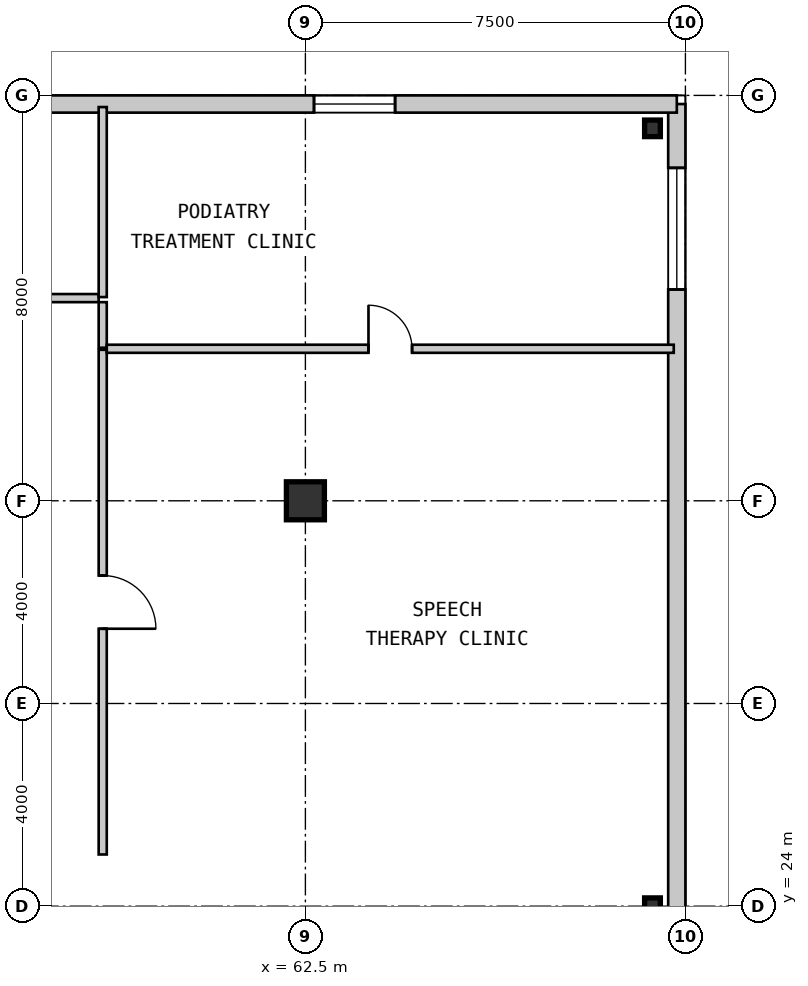
"""IFC4 building model, lengths in metres.
Left out: names, types, materials, properties, quantities, classifications, styles, units other than length and angle.
Written with IfcOpenShell. Run it as: python <this file> out.ifc"""

import sys

from ifc_helpers import new_model, si_unit, direction, frame, frame_2d, origin, origin_2d, place, context, subcontext, project, spatial, rectangle, circle, i_section, extrude, source, transform, mapped, element, fill, save


model = new_model("IFC4")
c1 = context("Model", 3, precision=1e-05, world=origin(), true_north=direction((0.0, 1.0)))
c2 = subcontext(c1, "Body", "Model", "MODEL_VIEW")
j1 = project(units=[si_unit("LENGTHUNIT", "METRE"), si_unit("PLANEANGLEUNIT", "RADIAN")], contexts=[c1])
p1 = place(None, origin())
s1 = spatial("IfcSite", under=j1, at=p1, CompositionType="ELEMENT")
p2 = place(p1, origin())
s2 = spatial("IfcBuilding", under=s1, at=p2, CompositionType="ELEMENT")
p3 = place(p2, frame((0.0, 0.0, 8.4)))
s3 = spatial("IfcBuildingStorey", under=s2, at=p3, CompositionType="ELEMENT", Elevation=8.4)
m1 = source(origin(), c2, "Body", "SweptSolid", [
    extrude(circle(Radius=0.375, at=origin_2d()), origin(), (0.0, 0.0, 1.0), 4.55),
])
p4 = place(p3, frame((62.5, 32.0, 0.0), z_axis=(0.0, 0.0, 1.0), x_axis=(1.0, 0.0, 0.0)))
e1 = element("IfcColumn", 1, at=p4, inside=s3, PredefinedType="COLUMN", context=c2, shape_type="MappedRepresentation", body=[
    mapped(m1, transform((0.0, 0.0, 0.0), scale=1.0)),
])
m2 = source(origin(), c2, "Body", "SweptSolid", [
    extrude(i_section(OverallWidth=0.311, OverallDepth=0.327, WebThickness=0.016, FlangeThickness=0.025, at=origin_2d()), origin(), (0.0, 0.0, 1.0), 4.55),
])
for number, where, z_axis, x_axis in (
    (2, (69.35, 24.0, 0.0), (0.0, 0.0, 1.0), (1.0, 0.0, 0.0)),
    (3, (69.35, 39.35, 0.0), (0.0, 0.0, 1.0), (1.0, 0.0, 0.0)),
):
    element("IfcColumn", number, at=place(p3, frame(where, z_axis=z_axis, x_axis=x_axis)), inside=s3, PredefinedType="COLUMN", context=c2, shape_type="MappedRepresentation", body=[
        mapped(m2, transform((0.0, 0.0, 0.0), scale=1.0)),
    ])
m3 = source(origin(), c2, "Body", "SweptSolid", [
    extrude(rectangle(XDim=39.66, YDim=0.34, at=frame_2d((19.83, 0.0))), origin(), (0.0, 0.0, 1.0), 4.29),
])
p5 = place(p3, frame((69.83, 0.17, 0.0), z_axis=(0.0, 0.0, 1.0), x_axis=(0.0, 1.0, 0.0)))
e4 = element("IfcWall", 4, at=p5, inside=s3, PredefinedType="SOLIDWALL", context=c2, shape_type="MappedRepresentation", body=[
    mapped(m3, transform((0.0, 0.0, 0.0), scale=1.0)),
])
m4 = source(origin(), c2, "Body", "SweptSolid", [
    extrude(rectangle(XDim=1.8, YDim=1.6, at=frame_2d((0.9, 0.8))), frame((0.0, 0.18, 0.0), z_axis=(0.0, -1.0, 0.0), x_axis=(1.0, 0.0, 0.0)), (0.0, 0.0, 1.0), 0.36),
])
p6 = place(p5, frame((3.2, 0.0, 0.95)))
e5 = element("IfcOpeningElement", 5, at=p6, cuts=e4, PredefinedType="OPENING", context=c2, shape_type="MappedRepresentation", body=[
    mapped(m4, transform((0.0, 0.0, 0.0), scale=1.0)),
])
m5 = source(origin(), c2, "Body", "SweptSolid", [
    extrude(rectangle(XDim=1.5, YDim=1.5, at=frame_2d((0.75, 0.75))), frame((0.0, 0.18, 0.0), z_axis=(0.0, -1.0, 0.0), x_axis=(1.0, 0.0, 0.0)), (0.0, 0.0, 1.0), 0.36),
])
p7 = place(p5, frame((7.8, 0.0, 0.95)))
e6 = element("IfcOpeningElement", 6, at=p7, cuts=e4, PredefinedType="OPENING", context=c2, shape_type="MappedRepresentation", body=[
    mapped(m5, transform((0.0, 0.0, 0.0), scale=1.0)),
])
m6 = source(origin(), c2, "Body", "SweptSolid", [
    extrude(rectangle(XDim=1.2, YDim=1.5, at=frame_2d((0.6, 0.75))), frame((0.0, 0.18, 0.0), z_axis=(0.0, -1.0, 0.0), x_axis=(1.0, 0.0, 0.0)), (0.0, 0.0, 1.0), 0.36),
])
p8 = place(p5, frame((21.2, 0.0, 0.95)))
e7 = element("IfcOpeningElement", 7, at=p8, cuts=e4, PredefinedType="OPENING", context=c2, shape_type="MappedRepresentation", body=[
    mapped(m6, transform((0.0, 0.0, 0.0), scale=1.0)),
])
m7 = source(origin(), c2, "Body", "SweptSolid", [
    extrude(rectangle(XDim=2.4, YDim=1.8, at=frame_2d((1.2, 0.9))), frame((0.0, 0.18, 0.0), z_axis=(0.0, -1.0, 0.0), x_axis=(1.0, 0.0, 0.0)), (0.0, 0.0, 1.0), 0.36),
])
p9 = place(p5, frame((36.0, 0.0, 0.95)))
e8 = element("IfcOpeningElement", 8, at=p9, cuts=e4, PredefinedType="OPENING", context=c2, shape_type="MappedRepresentation", body=[
    mapped(m7, transform((0.0, 0.0, 0.0), scale=1.0)),
])
m8 = source(origin(), c2, "Body", "SweptSolid", [
    extrude(rectangle(XDim=69.66, YDim=0.34, at=frame_2d((34.83, 0.0))), origin(), (0.0, 0.0, 1.0), 4.29),
])
p10 = place(p3, frame((0.17, 39.83, 0.0), z_axis=(0.0, 0.0, 1.0), x_axis=(1.0, 0.0, 0.0)))
e9 = element("IfcWall", 9, at=p10, inside=s3, PredefinedType="SOLIDWALL", context=c2, shape_type="MappedRepresentation", body=[
    mapped(m8, transform((0.0, 0.0, 0.0), scale=1.0)),
])
m9 = source(origin(), c2, "Body", "SweptSolid", [
    extrude(rectangle(XDim=1.6, YDim=1.2, at=frame_2d((0.8, 0.6))), frame((0.0, 0.18, 0.0), z_axis=(0.0, -1.0, 0.0), x_axis=(1.0, 0.0, 0.0)), (0.0, 0.0, 1.0), 0.36),
])
p11 = place(p10, frame((4.5, 0.0, 0.95)))
e10 = element("IfcOpeningElement", 10, at=p11, cuts=e9, PredefinedType="OPENING", context=c2, shape_type="MappedRepresentation", body=[
    mapped(m9, transform((0.0, 0.0, 0.0), scale=1.0)),
])
p12 = place(p10, frame((22.5, 0.0, 0.95)))
e11 = element("IfcOpeningElement", 11, at=p12, cuts=e9, PredefinedType="OPENING", context=c2, shape_type="MappedRepresentation", body=[
    mapped(m9, transform((0.0, 0.0, 0.0), scale=1.0)),
])
p13 = place(p10, frame((29.0, 0.0, 0.95)))
e12 = element("IfcOpeningElement", 12, at=p13, cuts=e9, PredefinedType="OPENING", context=c2, shape_type="MappedRepresentation", body=[
    mapped(m9, transform((0.0, 0.0, 0.0), scale=1.0)),
])
p14 = place(p10, frame((40.5, 0.0, 0.95)))
e13 = element("IfcOpeningElement", 13, at=p14, cuts=e9, PredefinedType="OPENING", context=c2, shape_type="MappedRepresentation", body=[
    mapped(m9, transform((0.0, 0.0, 0.0), scale=1.0)),
])
p15 = place(p10, frame((46.5, 0.0, 0.95)))
e14 = element("IfcOpeningElement", 14, at=p15, cuts=e9, PredefinedType="OPENING", context=c2, shape_type="MappedRepresentation", body=[
    mapped(m9, transform((0.0, 0.0, 0.0), scale=1.0)),
])
p16 = place(p10, frame((62.5, 0.0, 0.95)))
e15 = element("IfcOpeningElement", 15, at=p16, cuts=e9, PredefinedType="OPENING", context=c2, shape_type="MappedRepresentation", body=[
    mapped(m9, transform((0.0, 0.0, 0.0), scale=1.0)),
])
m10 = source(origin(), c2, "Body", "SweptSolid", [
    extrude(rectangle(XDim=9.959, YDim=0.16, at=frame_2d((4.98, 0.0))), origin(), (0.0, 0.0, 1.0), 4.29),
])
p17 = place(p3, frame((58.5, 34.98, 0.0), z_axis=(0.0, 0.0, 1.0), x_axis=(0.0, -1.0, 0.0)))
e16 = element("IfcWall", 16, at=p17, inside=s3, PredefinedType="PARTITIONING", context=c2, shape_type="MappedRepresentation", body=[
    mapped(m10, transform((0.0, 0.0, 0.0), scale=1.0)),
])
m11 = source(origin(), c2, "Body", "SweptSolid", [
    extrude(rectangle(XDim=1.05, YDim=2.1, at=frame_2d((0.525, 1.05))), frame((0.0, 0.09, 0.0), z_axis=(0.0, -1.0, 0.0), x_axis=(1.0, 0.0, 0.0)), (0.0, 0.0, 1.0), 0.18),
])
p18 = place(p17, frame((4.455, 0.0, 0.0)))
e17 = element("IfcOpeningElement", 17, at=p18, cuts=e16, PredefinedType="OPENING", context=c2, shape_type="MappedRepresentation", body=[
    mapped(m11, transform((0.0, 0.0, 0.0), scale=1.0)),
])
m12 = source(origin(), c2, "Body", "SweptSolid", [
    extrude(rectangle(XDim=0.9, YDim=0.16, at=frame_2d((0.45, 0.0))), origin(), (0.0, 0.0, 1.0), 4.29),
])
p19 = place(p3, frame((58.5, 35.92, 0.0), z_axis=(0.0, 0.0, 1.0), x_axis=(0.0, -1.0, 0.0)))
e18 = element("IfcWall", 18, at=p19, inside=s3, PredefinedType="PARTITIONING", context=c2, shape_type="MappedRepresentation", body=[
    mapped(m12, transform((0.0, 0.0, 0.0), scale=1.0)),
])
m13 = source(origin(), c2, "Body", "SweptSolid", [
    extrude(rectangle(XDim=2.84, YDim=0.16, at=frame_2d((1.42, 0.0))), origin(), (0.0, 0.0, 1.0), 4.29),
])
p20 = place(p3, frame((55.58, 36.0, 0.0), z_axis=(0.0, 0.0, 1.0), x_axis=(1.0, 0.0, 0.0)))
e19 = element("IfcWall", 19, at=p20, inside=s3, PredefinedType="PARTITIONING", context=c2, shape_type="MappedRepresentation", body=[
    mapped(m13, transform((0.0, 0.0, 0.0), scale=1.0)),
])
m14 = source(origin(), c2, "Body", "SweptSolid", [
    extrude(rectangle(XDim=11.19, YDim=0.16, at=frame_2d((5.595, 0.0))), origin(), (0.0, 0.0, 1.0), 4.29),
])
p21 = place(p3, frame((58.58, 35.0, 0.0), z_axis=(0.0, 0.0, 1.0), x_axis=(1.0, 0.0, 0.0)))
e20 = element("IfcWall", 20, at=p21, inside=s3, PredefinedType="PARTITIONING", context=c2, shape_type="MappedRepresentation", body=[
    mapped(m14, transform((0.0, 0.0, 0.0), scale=1.0)),
])
m15 = source(origin(), c2, "Body", "SweptSolid", [
    extrude(rectangle(XDim=0.86, YDim=2.1, at=frame_2d((0.43, 1.05))), frame((0.0, 0.09, 0.0), z_axis=(0.0, -1.0, 0.0), x_axis=(1.0, 0.0, 0.0)), (0.0, 0.0, 1.0), 0.18),
])
p22 = place(p21, frame((5.165, 0.0, 0.0)))
e21 = element("IfcOpeningElement", 21, at=p22, cuts=e20, PredefinedType="OPENING", context=c2, shape_type="MappedRepresentation", body=[
    mapped(m15, transform((0.0, 0.0, 0.0), scale=1.0)),
])
m16 = source(origin(), c2, "Body", "SweptSolid", [
    extrude(rectangle(XDim=3.75, YDim=0.16, at=frame_2d((1.875, 0.0))), origin(), (0.0, 0.0, 1.0), 4.29),
])
p23 = place(p3, frame((58.5, 36.02, 0.0), z_axis=(0.0, 0.0, 1.0), x_axis=(0.0, 1.0, 0.0)))
e22 = element("IfcWall", 22, at=p23, inside=s3, PredefinedType="PARTITIONING", context=c2, shape_type="MappedRepresentation", body=[
    mapped(m16, transform((0.0, 0.0, 0.0), scale=1.0)),
])
m17 = source(origin(), c2, "Body", "SweptSolid", [
    extrude(rectangle(XDim=2.4, YDim=1.8, at=frame_2d((1.2, 0.9))), frame((0.0, 0.03, 0.0), z_axis=(0.0, -1.0, 0.0), x_axis=(1.0, 0.0, 0.0)), (0.0, 0.0, 1.0), 0.06),
])
p24 = place(p9, origin())
e23 = element("IfcWindow", 23, at=p24, inside=s3, PartitioningType="SINGLE_PANEL", PredefinedType="WINDOW", context=c2, shape_type="MappedRepresentation", body=[
    mapped(m17, transform((0.0, 0.0, 0.0), scale=1.0)),
])
fill(e8, e23)
m18 = source(origin(), c2, "Body", "SweptSolid", [
    extrude(rectangle(XDim=1.6, YDim=1.2, at=frame_2d((0.8, 0.6))), frame((0.0, 0.03, 0.0), z_axis=(0.0, -1.0, 0.0), x_axis=(1.0, 0.0, 0.0)), (0.0, 0.0, 1.0), 0.06),
])
p25 = place(p16, origin())
e24 = element("IfcWindow", 24, at=p25, inside=s3, PartitioningType="SINGLE_PANEL", PredefinedType="WINDOW", context=c2, shape_type="MappedRepresentation", body=[
    mapped(m18, transform((0.0, 0.0, 0.0), scale=1.0)),
])
fill(e15, e24)
m19 = source(origin(), c2, "Body", "SweptSolid", [
    extrude(rectangle(XDim=1.05, YDim=2.1, at=frame_2d((0.525, 1.05))), frame((0.0, 0.025, 0.0), z_axis=(0.0, -1.0, 0.0), x_axis=(1.0, 0.0, 0.0)), (0.0, 0.0, 1.0), 0.05),
])
p26 = place(p18, origin())
e25 = element("IfcDoor", 25, at=p26, inside=s3, OperationType="SINGLE_SWING_RIGHT", PredefinedType="DOOR", context=c2, shape_type="MappedRepresentation", body=[
    mapped(m19, transform((0.0, 0.0, 0.0), scale=1.0)),
])
fill(e17, e25)
m20 = source(origin(), c2, "Body", "SweptSolid", [
    extrude(rectangle(XDim=0.86, YDim=2.1, at=frame_2d((0.43, 1.05))), frame((0.0, 0.025, 0.0), z_axis=(0.0, -1.0, 0.0), x_axis=(1.0, 0.0, 0.0)), (0.0, 0.0, 1.0), 0.05),
])
p27 = place(p22, origin())
e26 = element("IfcDoor", 26, at=p27, inside=s3, OperationType="SINGLE_SWING_LEFT", PredefinedType="DOOR", context=c2, shape_type="MappedRepresentation", body=[
    mapped(m20, transform((0.0, 0.0, 0.0), scale=1.0)),
])
fill(e21, e26)
save(model, sys.argv[1])
